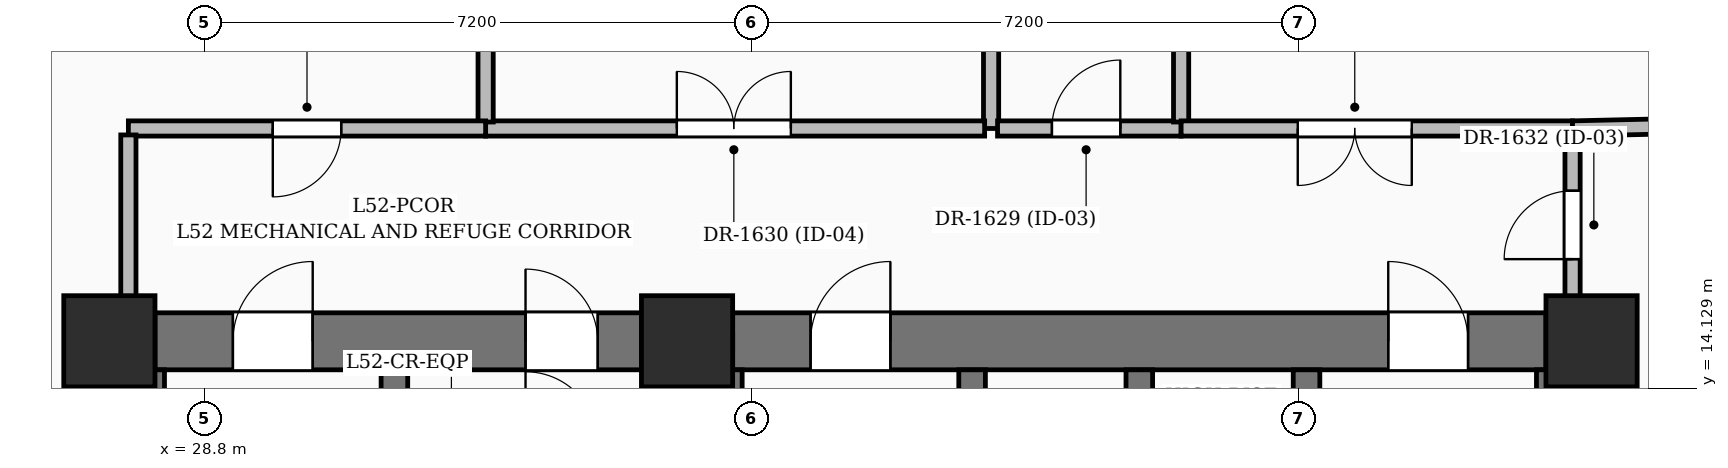
"""IFC4 building model, lengths in metres.
Left out: names, types, materials, properties, quantities, classifications, styles, units other than length and angle.
Written with IfcOpenShell. Run it as: python <this file> out.ifc"""

import sys

from ifc_helpers import new_model, si_unit, direction, frame, frame_2d, origin, origin_2d, place, context, subcontext, project, spatial, rectangle, extrude, element, fill, save


model = new_model("IFC4")
c1 = context("Model", 3, precision=1e-05, world=origin(), true_north=direction((0.0, 1.0)))
c2 = subcontext(c1, "Body", "Model", "MODEL_VIEW")
j1 = project(units=[si_unit("LENGTHUNIT", "METRE"), si_unit("PLANEANGLEUNIT", "RADIAN")], contexts=[c1])
p1 = place(None, origin())
s1 = spatial("IfcSite", under=j1, at=p1, CompositionType="ELEMENT")
p2 = place(p1, origin())
s2 = spatial("IfcBuilding", under=s1, at=p2, CompositionType="ELEMENT")
p3 = place(p2, frame((0.0, 0.0, 201.6)))
s3 = spatial("IfcBuildingStorey", under=s2, at=p3, CompositionType="ELEMENT", Elevation=201.6)
for number, where, z_axis, x_axis in (
    (1, (27.55, 14.75, 0.0), (0.0, 0.0, 1.0), (1.0, 0.0, 0.0)),
    (2, (35.15, 14.75, 0.0), (0.0, 0.0, 1.0), (1.0, 0.0, 0.0)),
    (3, (47.05, 14.75, 0.0), (0.0, 0.0, 1.0), (1.0, 0.0, 0.0)),
):
    element("IfcColumn", number, at=place(p3, frame(where, z_axis=z_axis, x_axis=x_axis)), inside=s3, PredefinedType="COLUMN", context=c2, shape_type="SweptSolid", body=[
        extrude(rectangle(XDim=1.2, YDim=1.2, at=origin_2d()), origin(), (0.0, 0.0, 1.0), 5.4),
    ])
p4 = place(p3, frame((28.15, 14.75, 0.0), z_axis=(0.0, 0.0, 1.0), x_axis=(1.0, 0.0, 0.0)))
e4 = element("IfcWall", 4, at=p4, inside=s3, PredefinedType="SHEAR", context=c2, shape_type="SweptSolid", body=[
    extrude(rectangle(XDim=6.4, YDim=0.75, at=frame_2d((3.2, 0.0))), origin(), (0.0, 0.0, 1.0), 5.4),
])
p5 = place(p4, frame((1.025, 0.0, 0.0)))
e5 = element("IfcOpeningElement", 5, at=p5, cuts=e4, PredefinedType="OPENING", context=c2, shape_type="SweptSolid", body=[
    extrude(rectangle(XDim=1.05, YDim=2.15, at=frame_2d((0.525, 1.075))), frame((0.0, 0.385, 0.0), z_axis=(0.0, -1.0, 0.0), x_axis=(1.0, 0.0, 0.0)), (0.0, 0.0, 1.0), 0.77),
])
p6 = place(p4, frame((4.875, 0.0, 0.0)))
e6 = element("IfcOpeningElement", 6, at=p6, cuts=e4, PredefinedType="OPENING", context=c2, shape_type="SweptSolid", body=[
    extrude(rectangle(XDim=0.95, YDim=2.15, at=frame_2d((0.475, 1.075))), frame((0.0, 0.385, 0.0), z_axis=(0.0, -1.0, 0.0), x_axis=(1.0, 0.0, 0.0)), (0.0, 0.0, 1.0), 0.77),
])
p7 = place(p3, frame((35.75, 14.75, 0.0), z_axis=(0.0, 0.0, 1.0), x_axis=(1.0, 0.0, 0.0)))
e7 = element("IfcWall", 7, at=p7, inside=s3, PredefinedType="SHEAR", context=c2, shape_type="SweptSolid", body=[
    extrude(rectangle(XDim=10.7, YDim=0.75, at=frame_2d((5.35, 0.0))), origin(), (0.0, 0.0, 1.0), 5.4),
])
p8 = place(p7, frame((1.025, 0.0, 0.0)))
e8 = element("IfcOpeningElement", 8, at=p8, cuts=e7, PredefinedType="OPENING", context=c2, shape_type="SweptSolid", body=[
    extrude(rectangle(XDim=1.05, YDim=2.15, at=frame_2d((0.525, 1.075))), frame((0.0, 0.385, 0.0), z_axis=(0.0, -1.0, 0.0), x_axis=(1.0, 0.0, 0.0)), (0.0, 0.0, 1.0), 0.77),
])
p9 = place(p7, frame((8.625, 0.0, 0.0)))
e9 = element("IfcOpeningElement", 9, at=p9, cuts=e7, PredefinedType="OPENING", context=c2, shape_type="SweptSolid", body=[
    extrude(rectangle(XDim=1.05, YDim=2.15, at=frame_2d((0.525, 1.075))), frame((0.0, 0.385, 0.0), z_axis=(0.0, -1.0, 0.0), x_axis=(1.0, 0.0, 0.0)), (0.0, 0.0, 1.0), 0.77),
])
for number, where, z_axis, x_axis in (
    (10, (27.55, 5.15, 0.0), (0.0, 0.0, 1.0), (0.0, 1.0, 0.0)),
    (11, (47.05, 5.15, 0.0), (0.0, 0.0, 1.0), (0.0, 1.0, 0.0)),
):
    element("IfcWall", number, at=place(p3, frame(where, z_axis=z_axis, x_axis=x_axis)), inside=s3, PredefinedType="SHEAR", context=c2, shape_type="SweptSolid", body=[
        extrude(rectangle(XDim=9.0, YDim=0.75, at=frame_2d((4.5, 0.0))), origin(), (0.0, 0.0, 1.0), 5.4),
    ])
p10 = place(p3, frame((28.1, 5.2, 0.0), z_axis=(0.0, 0.0, 1.0), x_axis=(0.0, 1.0, 0.0)))
e12 = element("IfcWall", 12, at=p10, inside=s3, PredefinedType="SOLIDWALL", context=c2, shape_type="SweptSolid", body=[
    extrude(rectangle(XDim=9.175, YDim=0.35, at=frame_2d((4.587, 0.0))), origin(), (0.0, 0.0, 1.0), 5.4),
])
p11 = place(p3, frame((31.3, 5.2, 0.0), z_axis=(0.0, 0.0, 1.0), x_axis=(0.0, 1.0, 0.0)))
e13 = element("IfcWall", 13, at=p11, inside=s3, PredefinedType="SOLIDWALL", context=c2, shape_type="SweptSolid", body=[
    extrude(rectangle(XDim=9.175, YDim=0.35, at=frame_2d((4.587, 0.0))), origin(), (0.0, 0.0, 1.0), 5.4),
])
p12 = place(p11, frame((6.02, 0.0, 0.0)))
e14 = element("IfcOpeningElement", 14, at=p12, cuts=e13, PredefinedType="OPENING", context=c2, shape_type="SweptSolid", body=[
    extrude(rectangle(XDim=1.0, YDim=2.15, at=frame_2d((0.5, 1.075))), frame((0.0, 0.185, 0.0), z_axis=(0.0, -1.0, 0.0), x_axis=(1.0, 0.0, 0.0)), (0.0, 0.0, 1.0), 0.37),
])
p13 = place(p3, frame((35.7, 5.2, 0.0), z_axis=(0.0, 0.0, 1.0), x_axis=(0.0, 1.0, 0.0)))
e15 = element("IfcWall", 15, at=p13, inside=s3, PredefinedType="SOLIDWALL", context=c2, shape_type="SweptSolid", body=[
    extrude(rectangle(XDim=9.175, YDim=0.35, at=frame_2d((4.587, 0.0))), origin(), (0.0, 0.0, 1.0), 5.4),
])
p14 = place(p13, frame((6.02, 0.0, 0.0)))
e16 = element("IfcOpeningElement", 16, at=p14, cuts=e15, PredefinedType="OPENING", context=c2, shape_type="SweptSolid", body=[
    extrude(rectangle(XDim=1.0, YDim=2.15, at=frame_2d((0.5, 1.075))), frame((0.0, 0.185, 0.0), z_axis=(0.0, -1.0, 0.0), x_axis=(1.0, 0.0, 0.0)), (0.0, 0.0, 1.0), 0.37),
])
p15 = place(p3, frame((38.9, 5.2, 0.0), z_axis=(0.0, 0.0, 1.0), x_axis=(0.0, 1.0, 0.0)))
e17 = element("IfcWall", 17, at=p15, inside=s3, PredefinedType="SOLIDWALL", context=c2, shape_type="SweptSolid", body=[
    extrude(rectangle(XDim=9.175, YDim=0.35, at=frame_2d((4.587, 0.0))), origin(), (0.0, 0.0, 1.0), 5.4),
])
p16 = place(p15, frame((6.02, 0.0, 0.0)))
e18 = element("IfcOpeningElement", 18, at=p16, cuts=e17, PredefinedType="OPENING", context=c2, shape_type="SweptSolid", body=[
    extrude(rectangle(XDim=1.0, YDim=2.15, at=frame_2d((0.5, 1.075))), frame((0.0, 0.185, 0.0), z_axis=(0.0, -1.0, 0.0), x_axis=(1.0, 0.0, 0.0)), (0.0, 0.0, 1.0), 0.37),
])
p17 = place(p3, frame((43.3, 5.2, 0.0), z_axis=(0.0, 0.0, 1.0), x_axis=(0.0, 1.0, 0.0)))
e19 = element("IfcWall", 19, at=p17, inside=s3, PredefinedType="SOLIDWALL", context=c2, shape_type="SweptSolid", body=[
    extrude(rectangle(XDim=9.175, YDim=0.35, at=frame_2d((4.587, 0.0))), origin(), (0.0, 0.0, 1.0), 5.4),
])
p18 = place(p17, frame((6.02, 0.0, 0.0)))
e20 = element("IfcOpeningElement", 20, at=p18, cuts=e19, PredefinedType="OPENING", context=c2, shape_type="SweptSolid", body=[
    extrude(rectangle(XDim=1.0, YDim=2.15, at=frame_2d((0.5, 1.075))), frame((0.0, 0.185, 0.0), z_axis=(0.0, -1.0, 0.0), x_axis=(1.0, 0.0, 0.0)), (0.0, 0.0, 1.0), 0.37),
])
p19 = place(p3, frame((46.5, 5.2, 0.0), z_axis=(0.0, 0.0, 1.0), x_axis=(0.0, 1.0, 0.0)))
e21 = element("IfcWall", 21, at=p19, inside=s3, PredefinedType="SOLIDWALL", context=c2, shape_type="SweptSolid", body=[
    extrude(rectangle(XDim=9.175, YDim=0.35, at=frame_2d((4.587, 0.0))), origin(), (0.0, 0.0, 1.0), 5.4),
])
p20 = place(p3, frame((41.1, 12.375, 0.0), z_axis=(0.0, 0.0, 1.0), x_axis=(0.0, 1.0, 0.0)))
e22 = element("IfcWall", 22, at=p20, inside=s3, PredefinedType="SOLIDWALL", context=c2, shape_type="SweptSolid", body=[
    extrude(rectangle(XDim=2.0, YDim=0.35, at=frame_2d((1.0, 0.0))), origin(), (0.0, 0.0, 1.0), 5.4),
])
p21 = place(p3, frame((34.72, 14.75, 0.0), z_axis=(0.0, 0.0, 1.0), x_axis=(1.0, 0.0, 0.0)))
e23 = element("IfcWall", 23, at=p21, inside=s3, PredefinedType="PARTITIONING", context=c2, shape_type="SweptSolid", body=[
    extrude(rectangle(XDim=1.03, YDim=0.2, at=frame_2d((0.515, 0.0))), origin(), (0.0, 0.0, 1.0), 4.335),
])
p22 = place(p3, frame((39.15, 23.0, 0.0), z_axis=(0.0, 0.0, 1.0), x_axis=(0.0, -1.0, 0.0)))
e24 = element("IfcWall", 24, at=p22, inside=s3, PredefinedType="PARTITIONING", context=c2, shape_type="SweptSolid", body=[
    extrude(rectangle(XDim=5.45, YDim=0.2, at=frame_2d((2.725, 0.0))), origin(), (0.0, 0.0, 1.0), 5.15),
])
p23 = place(p3, frame((39.235, 17.55, 0.0), z_axis=(0.0, 0.0, 1.0), x_axis=(1.0, 0.0, 0.0)))
e25 = element("IfcWall", 25, at=p23, inside=s3, PredefinedType="PARTITIONING", context=c2, shape_type="SweptSolid", body=[
    extrude(rectangle(XDim=2.415, YDim=0.2, at=frame_2d((1.208, 0.0))), origin(), (0.0, 0.0, 1.0), 5.15),
])
p24 = place(p23, frame((0.715, 0.0, 0.0)))
e26 = element("IfcOpeningElement", 26, at=p24, cuts=e25, PredefinedType="OPENING", context=c2, shape_type="SweptSolid", body=[
    extrude(rectangle(XDim=0.9, YDim=2.1, at=frame_2d((0.45, 1.05))), frame((0.0, 0.11, 0.0), z_axis=(0.0, -1.0, 0.0), x_axis=(1.0, 0.0, 0.0)), (0.0, 0.0, 1.0), 0.22),
])
p25 = place(p3, frame((41.65, 17.635, 0.0), z_axis=(0.0, 0.0, 1.0), x_axis=(0.0, 1.0, 0.0)))
e27 = element("IfcWall", 27, at=p25, inside=s3, PredefinedType="PARTITIONING", context=c2, shape_type="SweptSolid", body=[
    extrude(rectangle(XDim=8.165, YDim=0.2, at=frame_2d((4.083, 0.0))), origin(), (0.0, 0.0, 1.0), 5.15),
])
p26 = place(p3, frame((32.5, 17.55, 0.0), z_axis=(0.0, 0.0, 1.0), x_axis=(1.0, 0.0, 0.0)))
e28 = element("IfcWall", 28, at=p26, inside=s3, PredefinedType="PARTITIONING", context=c2, shape_type="SweptSolid", body=[
    extrude(rectangle(XDim=6.565, YDim=0.2, at=frame_2d((3.282, 0.0))), origin(), (0.0, 0.0, 1.0), 4.335),
])
p27 = place(p26, frame((2.516, 0.0, 0.0)))
e29 = element("IfcOpeningElement", 29, at=p27, cuts=e28, PredefinedType="OPENING", context=c2, shape_type="SweptSolid", body=[
    extrude(rectangle(XDim=1.5, YDim=2.2, at=frame_2d((0.75, 1.1))), frame((0.0, 0.11, 0.0), z_axis=(0.0, -1.0, 0.0), x_axis=(1.0, 0.0, 0.0)), (0.0, 0.0, 1.0), 0.22),
])
p28 = place(p3, frame((32.5, 22.915, 0.0), z_axis=(0.0, 0.0, 1.0), x_axis=(0.0, -1.0, 0.0)))
e30 = element("IfcWall", 30, at=p28, inside=s3, PredefinedType="PARTITIONING", context=c2, shape_type="SweptSolid", body=[
    extrude(rectangle(XDim=5.28, YDim=0.2, at=frame_2d((2.64, 0.0))), origin(), (0.0, 0.0, 1.0), 4.264),
])
p29 = place(p3, frame((46.8, 17.55, 0.0), z_axis=(0.0, 0.0, 1.0), x_axis=(-1.0, 0.0, 0.0)))
e31 = element("IfcWall", 31, at=p29, inside=s3, PredefinedType="PARTITIONING", context=c2, shape_type="SweptSolid", body=[
    extrude(rectangle(XDim=5.15, YDim=0.2, at=frame_2d((2.575, 0.0))), origin(), (0.0, 0.0, 1.0), 4.335),
])
p30 = place(p29, frame((2.115, 0.0, 0.0)))
e32 = element("IfcOpeningElement", 32, at=p30, cuts=e31, PredefinedType="OPENING", context=c2, shape_type="SweptSolid", body=[
    extrude(rectangle(XDim=1.5, YDim=2.2, at=frame_2d((0.75, 1.1))), frame((0.0, 0.11, 0.0), z_axis=(0.0, -1.0, 0.0), x_axis=(1.0, 0.0, 0.0)), (0.0, 0.0, 1.0), 0.22),
])
p31 = place(p3, frame((46.8, 15.125, 0.0), z_axis=(0.0, 0.0, 1.0), x_axis=(0.0, 1.0, 0.0)))
e33 = element("IfcWall", 33, at=p31, inside=s3, PredefinedType="PARTITIONING", context=c2, shape_type="SweptSolid", body=[
    extrude(rectangle(XDim=2.34, YDim=0.2, at=frame_2d((1.17, 0.0))), origin(), (0.0, 0.0, 1.0), 4.335),
])
p32 = place(p31, frame((0.706, 0.0, 0.0)))
e34 = element("IfcOpeningElement", 34, at=p32, cuts=e33, PredefinedType="OPENING", context=c2, shape_type="SweptSolid", body=[
    extrude(rectangle(XDim=0.9, YDim=2.1, at=frame_2d((0.45, 1.05))), frame((0.0, 0.11, 0.0), z_axis=(0.0, -1.0, 0.0), x_axis=(1.0, 0.0, 0.0)), (0.0, 0.0, 1.0), 0.22),
])
p33 = place(p3, frame((32.5, 17.55, 0.0), z_axis=(0.0, 0.0, 1.0), x_axis=(-1.0, 0.0, 0.0)))
e35 = element("IfcWall", 35, at=p33, inside=s3, PredefinedType="PARTITIONING", context=c2, shape_type="SweptSolid", body=[
    extrude(rectangle(XDim=4.7, YDim=0.2, at=frame_2d((2.35, 0.0))), origin(), (0.0, 0.0, 1.0), 5.15),
])
p34 = place(p33, frame((1.9, 0.0, 0.0)))
e36 = element("IfcOpeningElement", 36, at=p34, cuts=e35, PredefinedType="OPENING", context=c2, shape_type="SweptSolid", body=[
    extrude(rectangle(XDim=0.9, YDim=2.1, at=frame_2d((0.45, 1.05))), frame((0.0, 0.11, 0.0), z_axis=(0.0, -1.0, 0.0), x_axis=(1.0, 0.0, 0.0)), (0.0, 0.0, 1.0), 0.22),
])
p35 = place(p3, frame((27.8, 17.465, 0.0), z_axis=(0.0, 0.0, 1.0), x_axis=(0.0, -1.0, 0.0)))
e37 = element("IfcWall", 37, at=p35, inside=s3, PredefinedType="PARTITIONING", context=c2, shape_type="SweptSolid", body=[
    extrude(rectangle(XDim=2.34, YDim=0.2, at=frame_2d((1.17, 0.0))), origin(), (0.0, 0.0, 1.0), 5.15),
])
p36 = place(p3, frame((46.8, 17.55, 0.0), z_axis=(0.0, 0.0, 1.0), x_axis=(0.99974288939, 0.022674988722, 0.0)))
e38 = element("IfcWall", 38, at=p36, inside=s3, PredefinedType="PARTITIONING", context=c2, shape_type="SweptSolid", body=[
    extrude(rectangle(XDim=3.704, YDim=0.2, at=frame_2d((1.852, 0.0))), origin(), (0.0, 0.0, 1.0), 5.15),
])
p37 = place(p5, origin())
e39 = element("IfcDoor", 39, at=p37, inside=s3, OperationType="SINGLE_SWING_RIGHT", PredefinedType="DOOR", context=c2, shape_type="SweptSolid", body=[
    extrude(rectangle(XDim=1.05, YDim=2.15, at=frame_2d((0.525, 1.075))), frame((0.0, 0.025, 0.0), z_axis=(0.0, -1.0, 0.0), x_axis=(1.0, 0.0, 0.0)), (0.0, 0.0, 1.0), 0.05),
])
fill(e5, e39)
p38 = place(p8, origin())
e40 = element("IfcDoor", 40, at=p38, inside=s3, OperationType="SINGLE_SWING_RIGHT", PredefinedType="DOOR", context=c2, shape_type="SweptSolid", body=[
    extrude(rectangle(XDim=1.05, YDim=2.15, at=frame_2d((0.525, 1.075))), frame((0.0, 0.025, 0.0), z_axis=(0.0, -1.0, 0.0), x_axis=(1.0, 0.0, 0.0)), (0.0, 0.0, 1.0), 0.05),
])
fill(e8, e40)
p39 = place(p9, origin())
e41 = element("IfcDoor", 41, at=p39, inside=s3, OperationType="SINGLE_SWING_LEFT", PredefinedType="DOOR", context=c2, shape_type="SweptSolid", body=[
    extrude(rectangle(XDim=1.05, YDim=2.15, at=frame_2d((0.525, 1.075))), frame((0.0, 0.025, 0.0), z_axis=(0.0, -1.0, 0.0), x_axis=(1.0, 0.0, 0.0)), (0.0, 0.0, 1.0), 0.05),
])
fill(e9, e41)
p40 = place(p6, origin())
e42 = element("IfcDoor", 42, at=p40, inside=s3, OperationType="SINGLE_SWING_LEFT", PredefinedType="DOOR", context=c2, shape_type="SweptSolid", body=[
    extrude(rectangle(XDim=0.95, YDim=2.15, at=frame_2d((0.475, 1.075))), frame((0.0, 0.025, 0.0), z_axis=(0.0, -1.0, 0.0), x_axis=(1.0, 0.0, 0.0)), (0.0, 0.0, 1.0), 0.05),
])
fill(e6, e42)
p41 = place(p24, origin())
e43 = element("IfcDoor", 43, at=p41, inside=s3, OperationType="SINGLE_SWING_RIGHT", PredefinedType="DOOR", context=c2, shape_type="SweptSolid", body=[
    extrude(rectangle(XDim=0.9, YDim=2.1, at=frame_2d((0.45, 1.05))), frame((0.0, 0.025, 0.0), z_axis=(0.0, -1.0, 0.0), x_axis=(1.0, 0.0, 0.0)), (0.0, 0.0, 1.0), 0.05),
])
fill(e26, e43)
p42 = place(p27, origin())
e44 = element("IfcDoor", 44, at=p42, inside=s3, OperationType="DOUBLE_DOOR_SINGLE_SWING", PredefinedType="DOOR", context=c2, shape_type="SweptSolid", body=[
    extrude(rectangle(XDim=1.5, YDim=2.2, at=frame_2d((0.75, 1.1))), frame((0.0, 0.025, 0.0), z_axis=(0.0, -1.0, 0.0), x_axis=(1.0, 0.0, 0.0)), (0.0, 0.0, 1.0), 0.05),
])
fill(e29, e44)
p43 = place(p30, origin())
e45 = element("IfcDoor", 45, at=p43, inside=s3, OperationType="DOUBLE_DOOR_SINGLE_SWING", PredefinedType="DOOR", context=c2, shape_type="SweptSolid", body=[
    extrude(rectangle(XDim=1.5, YDim=2.2, at=frame_2d((0.75, 1.1))), frame((0.0, 0.025, 0.0), z_axis=(0.0, -1.0, 0.0), x_axis=(1.0, 0.0, 0.0)), (0.0, 0.0, 1.0), 0.05),
])
fill(e32, e45)
p44 = place(p32, origin())
e46 = element("IfcDoor", 46, at=p44, inside=s3, OperationType="SINGLE_SWING_LEFT", PredefinedType="DOOR", context=c2, shape_type="SweptSolid", body=[
    extrude(rectangle(XDim=0.9, YDim=2.1, at=frame_2d((0.45, 1.05))), frame((0.0, 0.025, 0.0), z_axis=(0.0, -1.0, 0.0), x_axis=(1.0, 0.0, 0.0)), (0.0, 0.0, 1.0), 0.05),
])
fill(e34, e46)
p45 = place(p34, origin())
e47 = element("IfcDoor", 47, at=p45, inside=s3, OperationType="SINGLE_SWING_RIGHT", PredefinedType="DOOR", context=c2, shape_type="SweptSolid", body=[
    extrude(rectangle(XDim=0.9, YDim=2.1, at=frame_2d((0.45, 1.05))), frame((0.0, 0.025, 0.0), z_axis=(0.0, -1.0, 0.0), x_axis=(1.0, 0.0, 0.0)), (0.0, 0.0, 1.0), 0.05),
])
fill(e36, e47)
save(model, sys.argv[1])
